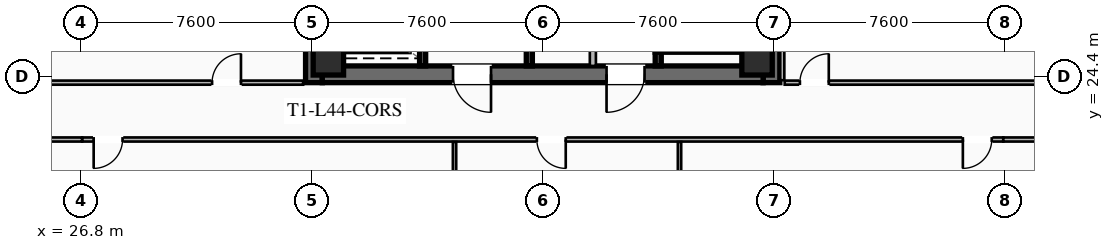
"""IFC4 building model, lengths in metres.
Left out: names, types, materials, properties, quantities, classifications, styles, units other than length and angle.
Written with IfcOpenShell. Run it as: python <this file> out.ifc"""

import sys

from ifc_helpers import new_model, si_unit, direction, frame, frame_2d, origin, origin_2d, place, context, subcontext, project, spatial, rectangle, hollow_rectangle, extrude, element, fill, save


model = new_model("IFC4")
c1 = context("Model", 3, precision=1e-05, world=origin(), true_north=direction((0.0, 1.0)))
c2 = subcontext(c1, "Body", "Model", "MODEL_VIEW")
j1 = project(units=[si_unit("LENGTHUNIT", "METRE"), si_unit("PLANEANGLEUNIT", "RADIAN")], contexts=[c1])
p1 = place(None, origin())
s1 = spatial("IfcSite", under=j1, at=p1, CompositionType="ELEMENT")
p2 = place(p1, origin())
s2 = spatial("IfcBuilding", under=s1, at=p2, CompositionType="ELEMENT")
p3 = place(p2, frame((0.0, 0.0, 164.1)))
s3 = spatial("IfcBuildingStorey", under=s2, at=p3, CompositionType="ELEMENT", Elevation=164.1)
for number, where, z_axis, x_axis in (
    (1, (34.475, 24.2, 0.0), (0.0, 0.0, 1.0), (0.0, 1.0, 0.0)),
    (2, (49.525, 39.8, 0.0), (0.0, 0.0, 1.0), (0.0, -1.0, 0.0)),
):
    element("IfcWall", number, at=place(p3, frame(where, z_axis=z_axis, x_axis=x_axis)), inside=s3, PredefinedType="SHEAR", context=c2, shape_type="SweptSolid", body=[
        extrude(rectangle(XDim=15.6, YDim=0.55, at=frame_2d((7.8, 0.0))), origin(), (0.0, 0.0, 1.0), 3.55),
    ])
p4 = place(p3, frame((49.25, 24.475, 0.0), z_axis=(0.0, 0.0, 1.0), x_axis=(-1.0, 0.0, 0.0)))
e3 = element("IfcWall", 3, at=p4, inside=s3, PredefinedType="SHEAR", context=c2, shape_type="SweptSolid", body=[
    extrude(rectangle(XDim=14.5, YDim=0.55, at=frame_2d((7.25, 0.0))), origin(), (0.0, 0.0, 1.0), 3.55),
])
p5 = place(p4, frame((8.95, 0.0, 0.0)))
e4 = element("IfcOpeningElement", 4, at=p5, cuts=e3, PredefinedType="OPENING", context=c2, shape_type="SweptSolid", body=[
    extrude(rectangle(XDim=1.25, YDim=2.25, at=frame_2d((0.625, 1.125))), frame((0.0, 0.285, 0.0), z_axis=(0.0, -1.0, 0.0), x_axis=(1.0, 0.0, 0.0)), (0.0, 0.0, 1.0), 0.57),
])
p6 = place(p4, frame((3.9, 0.0, 0.0)))
e5 = element("IfcOpeningElement", 5, at=p6, cuts=e3, PredefinedType="OPENING", context=c2, shape_type="SweptSolid", body=[
    extrude(rectangle(XDim=1.25, YDim=2.25, at=frame_2d((0.625, 1.125))), frame((0.0, 0.285, 0.0), z_axis=(0.0, -1.0, 0.0), x_axis=(1.0, 0.0, 0.0)), (0.0, 0.0, 1.0), 0.57),
])
for number, where, z_axis, x_axis in (
    (6, (34.95, 24.95, 0.0), (0.0, 0.0, 1.0), (1.0, 0.0, 0.0)),
    (7, (49.05, 24.95, 0.0), (0.0, 0.0, 1.0), (1.0, 0.0, 0.0)),
):
    element("IfcColumn", number, at=place(p3, frame(where, z_axis=z_axis, x_axis=x_axis)), inside=s3, PredefinedType="COLUMN", context=c2, shape_type="SweptSolid", body=[
        extrude(hollow_rectangle(XDim=1.0, YDim=1.0, WallThickness=0.04, at=origin_2d()), origin(), (0.0, 0.0, 1.0), 3.37),
    ])
p7 = place(p3, frame((45.8, 32.8, 0.0), z_axis=(0.0, 0.0, 1.0), x_axis=(0.0, -1.0, 0.0)))
e8 = element("IfcWall", 8, at=p7, inside=s3, PredefinedType="SHEAR", context=c2, shape_type="SweptSolid", body=[
    extrude(rectangle(XDim=8.05, YDim=0.2, at=frame_2d((4.025, 0.0))), origin(), (0.0, 0.0, 1.0), 3.37),
])
p8 = place(p7, frame((0.45, 0.0, 0.0)))
e9 = element("IfcOpeningElement", 9, at=p8, cuts=e8, PredefinedType="OPENING", context=c2, shape_type="SweptSolid", body=[
    extrude(rectangle(XDim=1.15, YDim=2.2, at=frame_2d((0.575, 1.1))), frame((0.0, 0.11, 0.0), z_axis=(0.0, -1.0, 0.0), x_axis=(1.0, 0.0, 0.0)), (0.0, 0.0, 1.0), 0.22),
])
p9 = place(p3, frame((41.56, 24.75, 0.0), z_axis=(0.0, 0.0, 1.0), x_axis=(0.0, 1.0, 0.0)))
e10 = element("IfcWall", 10, at=p9, inside=s3, PredefinedType="SHEAR", context=c2, shape_type="SweptSolid", body=[
    extrude(rectangle(XDim=14.5, YDim=0.2, at=frame_2d((7.25, 0.0))), origin(), (0.0, 0.0, 1.0), 3.37),
])
p10 = place(p3, frame((38.05, 24.75, 0.0), z_axis=(0.0, 0.0, 1.0), x_axis=(0.0, 1.0, 0.0)))
e11 = element("IfcWall", 11, at=p10, inside=s3, PredefinedType="SHEAR", context=c2, shape_type="SweptSolid", body=[
    extrude(rectangle(XDim=6.45, YDim=0.2, at=frame_2d((3.225, 0.0))), origin(), (0.0, 0.0, 1.0), 3.37),
])
p11 = place(p10, frame((4.875, 0.0, 0.0)))
e12 = element("IfcOpeningElement", 12, at=p11, cuts=e11, PredefinedType="OPENING", context=c2, shape_type="SweptSolid", body=[
    extrude(rectangle(XDim=1.3, YDim=2.25, at=frame_2d((0.65, 1.125))), frame((0.0, 0.11, 0.0), z_axis=(0.0, -1.0, 0.0), x_axis=(1.0, 0.0, 0.0)), (0.0, 0.0, 1.0), 0.22),
])
p12 = place(p10, frame((2.875, 0.0, 0.0)))
e13 = element("IfcOpeningElement", 13, at=p12, cuts=e11, PredefinedType="OPENING", context=c2, shape_type="SweptSolid", body=[
    extrude(rectangle(XDim=1.3, YDim=2.25, at=frame_2d((0.65, 1.125))), frame((0.0, 0.11, 0.0), z_axis=(0.0, -1.0, 0.0), x_axis=(1.0, 0.0, 0.0)), (0.0, 0.0, 1.0), 0.22),
])
p13 = place(p10, frame((0.675, 0.0, 0.0)))
e14 = element("IfcOpeningElement", 14, at=p13, cuts=e11, PredefinedType="OPENING", context=c2, shape_type="SweptSolid", body=[
    extrude(rectangle(XDim=1.3, YDim=2.25, at=frame_2d((0.65, 1.125))), frame((0.0, 0.11, 0.0), z_axis=(0.0, -1.0, 0.0), x_axis=(1.0, 0.0, 0.0)), (0.0, 0.0, 1.0), 0.22),
])
p14 = place(p3, frame((43.65, 24.75, 0.0), z_axis=(0.0, 0.0, 1.0), x_axis=(0.0, 1.0, 0.0)))
e15 = element("IfcWall", 15, at=p14, inside=s3, PredefinedType="SOLIDWALL", context=c2, shape_type="SweptSolid", body=[
    extrude(rectangle(XDim=6.9, YDim=0.2, at=frame_2d((3.45, 0.0))), origin(), (0.0, 0.0, 1.0), 2.723),
])
p15 = place(p14, frame((0.85, 0.0, 0.0)))
e16 = element("IfcOpeningElement", 16, at=p15, cuts=e15, PredefinedType="OPENING", context=c2, shape_type="SweptSolid", body=[
    extrude(rectangle(XDim=0.95, YDim=2.05, at=frame_2d((0.475, 1.025))), frame((0.0, 0.11, 0.0), z_axis=(0.0, -1.0, 0.0), x_axis=(1.0, 0.0, 0.0)), (0.0, 0.0, 1.0), 0.22),
])
p16 = place(p14, frame((4.8, 0.0, 0.0)))
e17 = element("IfcOpeningElement", 17, at=p16, cuts=e15, PredefinedType="OPENING", context=c2, shape_type="SweptSolid", body=[
    extrude(rectangle(XDim=1.05, YDim=2.2, at=frame_2d((0.525, 1.1))), frame((0.0, 0.11, 0.0), z_axis=(0.0, -1.0, 0.0), x_axis=(1.0, 0.0, 0.0)), (0.0, 0.0, 1.0), 0.22),
])
p17 = place(p3, frame((57.15, 22.33, 0.0), z_axis=(0.0, 0.0, 1.0), x_axis=(-1.0, 0.0, 0.0)))
e18 = element("IfcWall", 18, at=p17, inside=s3, PredefinedType="PARTITIONING", context=c2, shape_type="SweptSolid", body=[
    extrude(rectangle(XDim=30.3, YDim=0.135, at=frame_2d((15.15, 0.0))), origin(), (0.0, 0.0, 1.0), 2.723),
])
p18 = place(p17, frame((28.97, 0.0, 0.0)))
e19 = element("IfcOpeningElement", 19, at=p18, cuts=e18, PredefinedType="OPENING", context=c2, shape_type="SweptSolid", body=[
    extrude(rectangle(XDim=0.95, YDim=2.05, at=frame_2d((0.475, 1.025))), frame((0.0, 0.077, 0.0), z_axis=(0.0, -1.0, 0.0), x_axis=(1.0, 0.0, 0.0)), (0.0, 0.0, 1.0), 0.155),
])
p19 = place(p17, frame((14.392, 0.0, 0.0)))
e20 = element("IfcOpeningElement", 20, at=p19, cuts=e18, PredefinedType="OPENING", context=c2, shape_type="SweptSolid", body=[
    extrude(rectangle(XDim=0.95, YDim=2.05, at=frame_2d((0.475, 1.025))), frame((0.0, 0.077, 0.0), z_axis=(0.0, -1.0, 0.0), x_axis=(1.0, 0.0, 0.0)), (0.0, 0.0, 1.0), 0.155),
])
p20 = place(p17, frame((0.38, 0.0, 0.0)))
e21 = element("IfcOpeningElement", 21, at=p20, cuts=e18, PredefinedType="OPENING", context=c2, shape_type="SweptSolid", body=[
    extrude(rectangle(XDim=0.95, YDim=2.05, at=frame_2d((0.475, 1.025))), frame((0.0, 0.077, 0.0), z_axis=(0.0, -1.0, 0.0), x_axis=(1.0, 0.0, 0.0)), (0.0, 0.0, 1.0), 0.155),
])
for number, where, z_axis, x_axis in (
    (22, (24.32, 22.33, 0.0), (0.0, 0.0, 1.0), (1.0, 0.0, 0.0)),
    (23, (57.15, 22.33, 0.0), (0.0, 0.0, 1.0), (1.0, 0.0, 0.0)),
):
    element("IfcWall", number, at=place(p3, frame(where, z_axis=z_axis, x_axis=x_axis)), inside=s3, PredefinedType="PARTITIONING", context=c2, shape_type="SweptSolid", body=[
        extrude(rectangle(XDim=2.53, YDim=0.135, at=frame_2d((1.265, 0.0))), origin(), (0.0, 0.0, 1.0), 2.723),
    ])
for number, where, z_axis, x_axis in (
    (24, (39.1, 14.32, 0.0), (0.0, 0.0, 1.0), (0.0, 1.0, 0.0)),
    (25, (46.5, 14.32, 0.0), (0.0, 0.0, 1.0), (0.0, 1.0, 0.0)),
):
    element("IfcWall", number, at=place(p3, frame(where, z_axis=z_axis, x_axis=x_axis)), inside=s3, PredefinedType="PARTITIONING", context=c2, shape_type="SweptSolid", body=[
        extrude(rectangle(XDim=7.93, YDim=0.11, at=frame_2d((3.965, 0.0))), origin(), (0.0, 0.0, 1.0), 2.723),
    ])
p21 = place(p3, frame((49.88, 39.72, 0.0), z_axis=(0.0, 0.0, 1.0), x_axis=(0.0, -1.0, 0.0)))
e26 = element("IfcWall", 26, at=p21, inside=s3, PredefinedType="PARTITIONING", context=c2, shape_type="SweptSolid", body=[
    extrude(rectangle(XDim=15.44, YDim=0.135, at=frame_2d((7.72, 0.0))), origin(), (0.0, 0.0, 1.0), 2.723),
])
p22 = place(p3, frame((49.96, 24.2, 0.0), z_axis=(0.0, 0.0, 1.0), x_axis=(1.0, 0.0, 0.0)))
e27 = element("IfcWall", 27, at=p22, inside=s3, PredefinedType="PARTITIONING", context=c2, shape_type="SweptSolid", body=[
    extrude(rectangle(XDim=9.72, YDim=0.135, at=frame_2d((4.86, 0.0))), origin(), (0.0, 0.0, 1.0), 2.723),
])
p23 = place(p22, frame((0.5, 0.0, 0.0)))
e28 = element("IfcOpeningElement", 28, at=p23, cuts=e27, PredefinedType="OPENING", context=c2, shape_type="SweptSolid", body=[
    extrude(rectangle(XDim=0.95, YDim=2.05, at=frame_2d((0.475, 1.025))), frame((0.0, 0.077, 0.0), z_axis=(0.0, -1.0, 0.0), x_axis=(1.0, 0.0, 0.0)), (0.0, 0.0, 1.0), 0.155),
])
p24 = place(p3, frame((24.32, 24.2, 0.0), z_axis=(0.0, 0.0, 1.0), x_axis=(1.0, 0.0, 0.0)))
e29 = element("IfcWall", 29, at=p24, inside=s3, PredefinedType="PARTITIONING", context=c2, shape_type="SweptSolid", body=[
    extrude(rectangle(XDim=9.8, YDim=0.135, at=frame_2d((4.9, 0.0))), origin(), (0.0, 0.0, 1.0), 2.723),
])
p25 = place(p24, frame((6.805, 0.0, 0.0)))
e30 = element("IfcOpeningElement", 30, at=p25, cuts=e29, PredefinedType="OPENING", context=c2, shape_type="SweptSolid", body=[
    extrude(rectangle(XDim=0.95, YDim=2.05, at=frame_2d((0.475, 1.025))), frame((0.0, 0.077, 0.0), z_axis=(0.0, -1.0, 0.0), x_axis=(1.0, 0.0, 0.0)), (0.0, 0.0, 1.0), 0.155),
])
p26 = place(p5, origin())
e31 = element("IfcDoor", 31, at=p26, inside=s3, OperationType="SINGLE_SWING_LEFT", PredefinedType="DOOR", context=c2, shape_type="SweptSolid", body=[
    extrude(rectangle(XDim=1.25, YDim=2.25, at=frame_2d((0.625, 1.125))), frame((0.0, 0.025, 0.0), z_axis=(0.0, -1.0, 0.0), x_axis=(1.0, 0.0, 0.0)), (0.0, 0.0, 1.0), 0.05),
])
fill(e4, e31)
p27 = place(p6, origin())
e32 = element("IfcDoor", 32, at=p27, inside=s3, OperationType="SINGLE_SWING_RIGHT", PredefinedType="DOOR", context=c2, shape_type="SweptSolid", body=[
    extrude(rectangle(XDim=1.25, YDim=2.25, at=frame_2d((0.625, 1.125))), frame((0.0, 0.025, 0.0), z_axis=(0.0, -1.0, 0.0), x_axis=(1.0, 0.0, 0.0)), (0.0, 0.0, 1.0), 0.05),
])
fill(e5, e32)
p28 = place(p18, origin())
e33 = element("IfcDoor", 33, at=p28, inside=s3, OperationType="SINGLE_SWING_RIGHT", PredefinedType="DOOR", context=c2, shape_type="SweptSolid", body=[
    extrude(rectangle(XDim=0.95, YDim=2.05, at=frame_2d((0.475, 1.025))), frame((0.0, 0.025, 0.0), z_axis=(0.0, -1.0, 0.0), x_axis=(1.0, 0.0, 0.0)), (0.0, 0.0, 1.0), 0.05),
])
fill(e19, e33)
p29 = place(p19, origin())
e34 = element("IfcDoor", 34, at=p29, inside=s3, OperationType="SINGLE_SWING_LEFT", PredefinedType="DOOR", context=c2, shape_type="SweptSolid", body=[
    extrude(rectangle(XDim=0.95, YDim=2.05, at=frame_2d((0.475, 1.025))), frame((0.0, 0.025, 0.0), z_axis=(0.0, -1.0, 0.0), x_axis=(1.0, 0.0, 0.0)), (0.0, 0.0, 1.0), 0.05),
])
fill(e20, e34)
p30 = place(p20, origin())
e35 = element("IfcDoor", 35, at=p30, inside=s3, OperationType="SINGLE_SWING_RIGHT", PredefinedType="DOOR", context=c2, shape_type="SweptSolid", body=[
    extrude(rectangle(XDim=0.95, YDim=2.05, at=frame_2d((0.475, 1.025))), frame((0.0, 0.025, 0.0), z_axis=(0.0, -1.0, 0.0), x_axis=(1.0, 0.0, 0.0)), (0.0, 0.0, 1.0), 0.05),
])
fill(e21, e35)
p31 = place(p23, origin())
e36 = element("IfcDoor", 36, at=p31, inside=s3, OperationType="SINGLE_SWING_RIGHT", PredefinedType="DOOR", context=c2, shape_type="SweptSolid", body=[
    extrude(rectangle(XDim=0.95, YDim=2.05, at=frame_2d((0.475, 1.025))), frame((0.0, 0.025, 0.0), z_axis=(0.0, -1.0, 0.0), x_axis=(1.0, 0.0, 0.0)), (0.0, 0.0, 1.0), 0.05),
])
fill(e28, e36)
p32 = place(p25, origin())
e37 = element("IfcDoor", 37, at=p32, inside=s3, OperationType="SINGLE_SWING_RIGHT", PredefinedType="DOOR", context=c2, shape_type="SweptSolid", body=[
    extrude(rectangle(XDim=0.95, YDim=2.05, at=frame_2d((0.475, 1.025))), frame((0.0, 0.025, 0.0), z_axis=(0.0, -1.0, 0.0), x_axis=(1.0, 0.0, 0.0)), (0.0, 0.0, 1.0), 0.05),
])
fill(e30, e37)
save(model, sys.argv[1])
